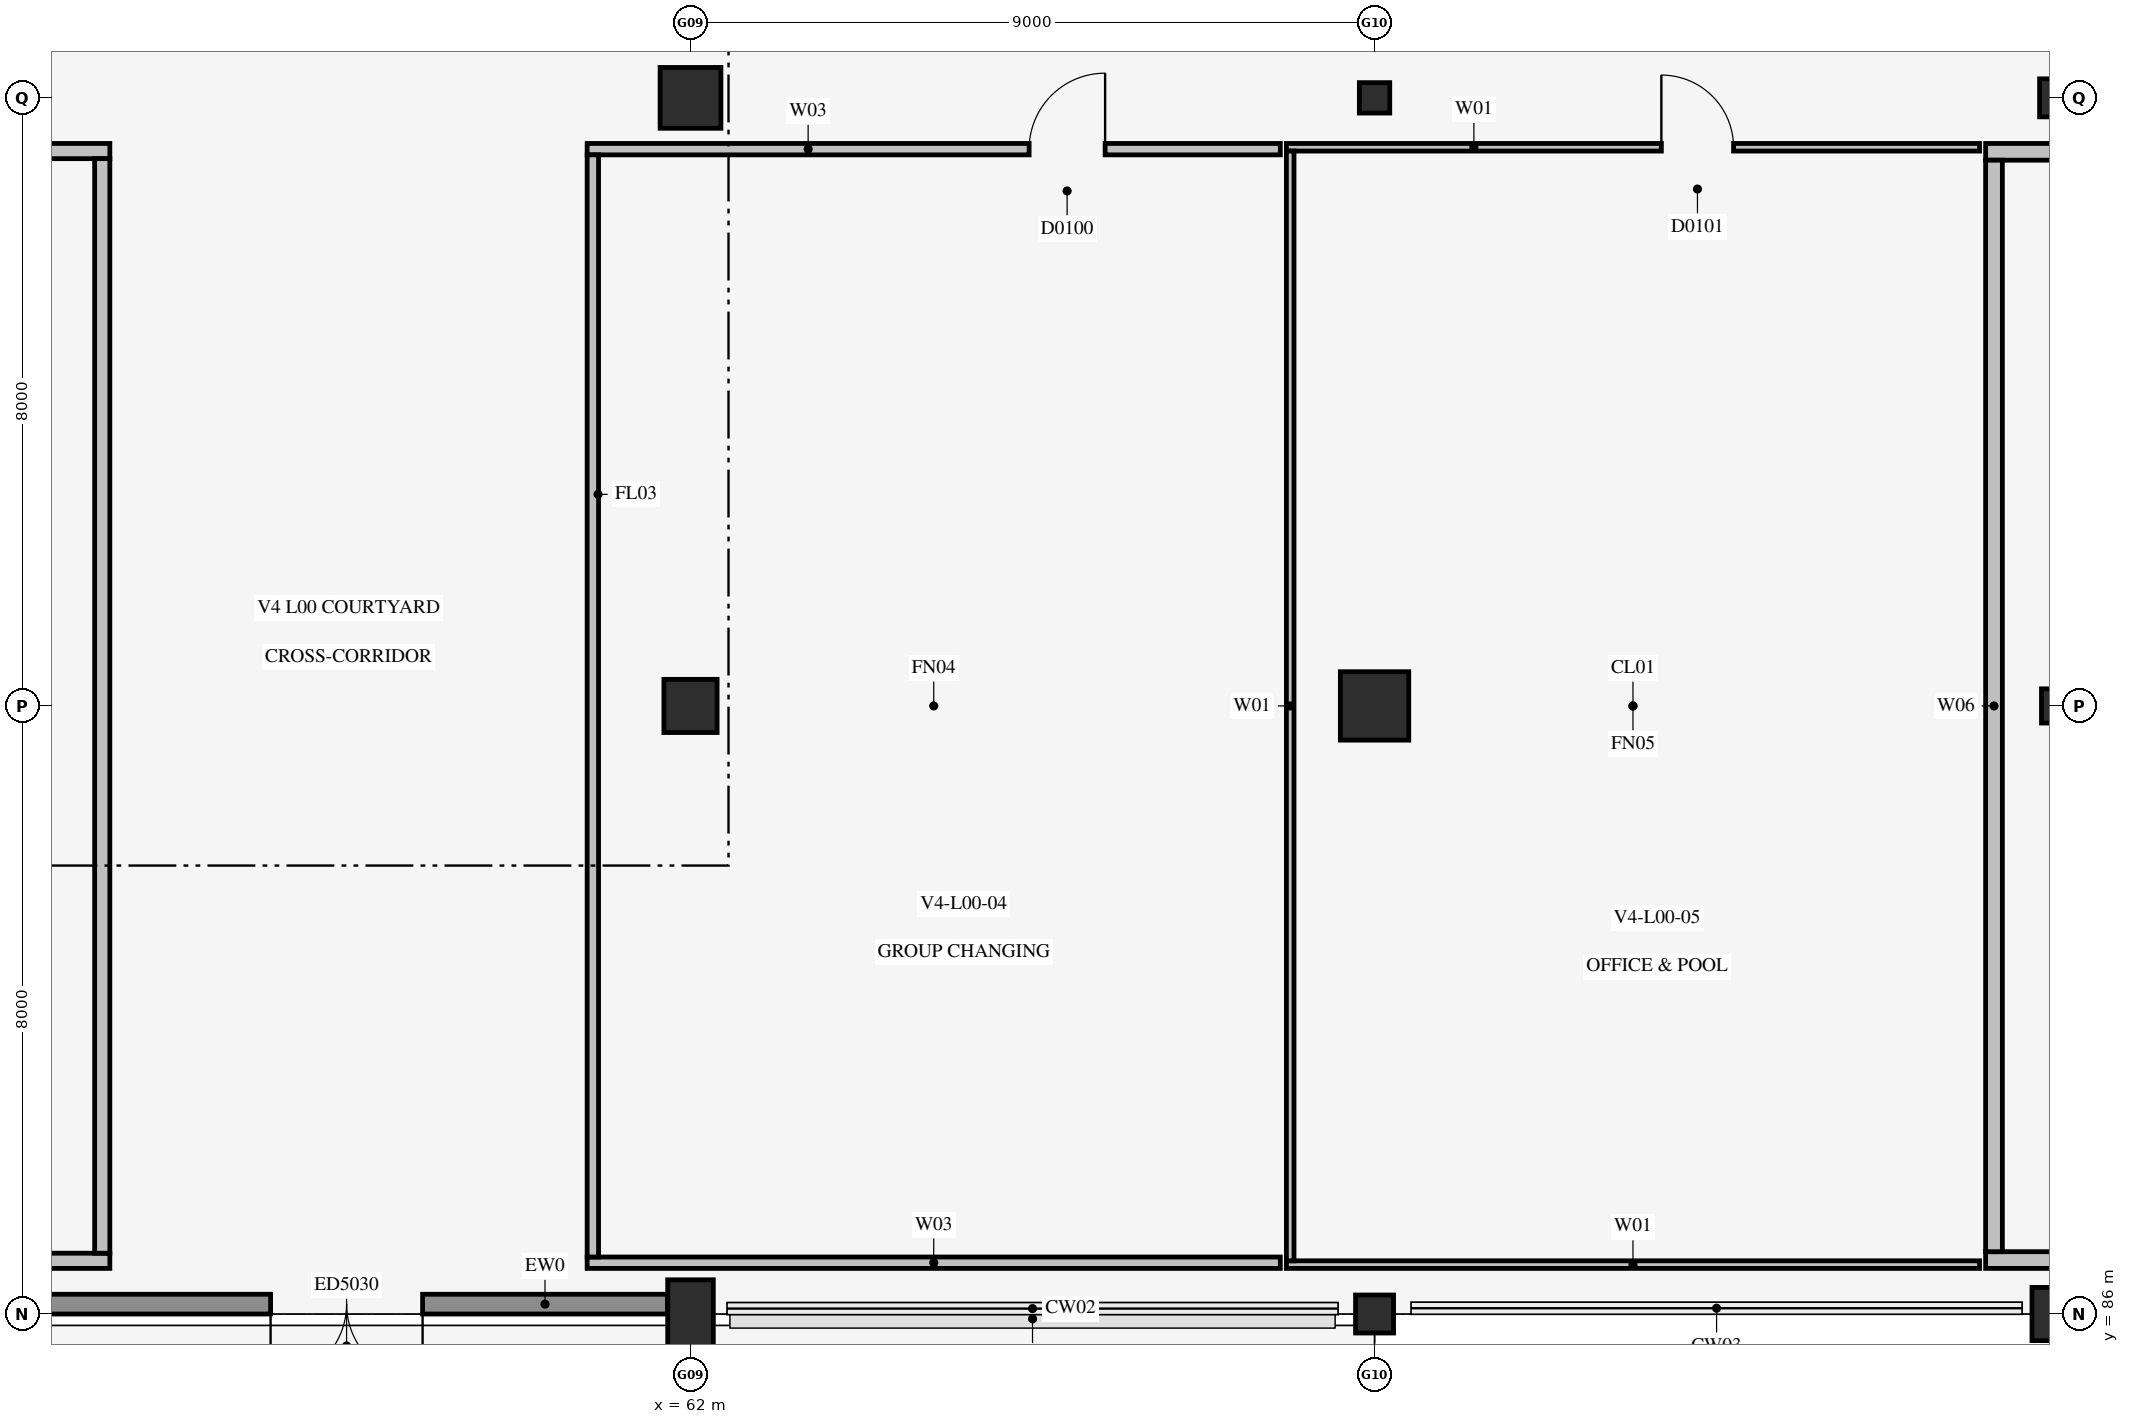
"""IFC4 building model, lengths in metres.
Left out: names, types, materials, properties, quantities, classifications, styles, units other than length and angle.
Written with IfcOpenShell. Run it as: python <this file> out.ifc"""

import sys

from ifc_helpers import new_model, si_unit, direction, frame, frame_2d, origin, origin_2d, place, context, subcontext, project, spatial, rectangle, circle, extrude, element, fill, save


model = new_model("IFC4")
c1 = context("Model", 3, precision=1e-05, world=origin(), true_north=direction((0.0, 1.0)))
c2 = subcontext(c1, "Body", "Model", "MODEL_VIEW")
j1 = project(units=[si_unit("LENGTHUNIT", "METRE"), si_unit("PLANEANGLEUNIT", "RADIAN")], contexts=[c1])
p1 = place(None, origin())
s1 = spatial("IfcSite", under=j1, at=p1, CompositionType="ELEMENT")
p2 = place(p1, origin())
s2 = spatial("IfcBuilding", under=s1, at=p2, CompositionType="ELEMENT")
p3 = place(p2, origin())
s3 = spatial("IfcBuildingStorey", under=s2, at=p3, CompositionType="ELEMENT", Elevation=0.0)
p4 = place(p3, frame((62.0, 86.0, 0.0), z_axis=(0.0, 0.0, 1.0), x_axis=(1.0, 0.0, 0.0)))
e1 = element("IfcColumn", 1, at=p4, inside=s3, PredefinedType="COLUMN", context=c2, shape_type="SweptSolid", body=[
    extrude(rectangle(XDim=0.6, YDim=0.9, at=origin_2d()), origin(), (0.0, 0.0, 1.0), 5.4),
])
p5 = place(p3, frame((62.0, 94.0, 0.0), z_axis=(0.0, 0.0, 1.0), x_axis=(1.0, 0.0, 0.0)))
e2 = element("IfcColumn", 2, at=p5, inside=s3, PredefinedType="COLUMN", context=c2, shape_type="SweptSolid", body=[
    extrude(circle(Radius=0.35, at=origin_2d()), origin(), (0.0, 0.0, 1.0), 5.4),
])
p6 = place(p3, frame((62.0, 102.0, 0.0), z_axis=(0.0, 0.0, 1.0), x_axis=(1.0, 0.0, 0.0)))
e3 = element("IfcColumn", 3, at=p6, inside=s3, PredefinedType="COLUMN", context=c2, shape_type="SweptSolid", body=[
    extrude(circle(Radius=0.4, at=origin_2d()), origin(), (0.0, 0.0, 1.0), 5.4),
])
p7 = place(p3, frame((71.0, 86.0, 0.0), z_axis=(0.0, 0.0, 1.0), x_axis=(1.0, 0.0, 0.0)))
e4 = element("IfcColumn", 4, at=p7, inside=s3, PredefinedType="COLUMN", context=c2, shape_type="SweptSolid", body=[
    extrude(circle(Radius=0.25, at=origin_2d()), origin(), (0.0, 0.0, 1.0), 5.4),
])
p8 = place(p3, frame((71.0, 94.0, 0.0), z_axis=(0.0, 0.0, 1.0), x_axis=(1.0, 0.0, 0.0)))
e5 = element("IfcColumn", 5, at=p8, inside=s3, PredefinedType="COLUMN", context=c2, shape_type="SweptSolid", body=[
    extrude(circle(Radius=0.45, at=origin_2d()), origin(), (0.0, 0.0, 1.0), 5.4),
])
p9 = place(p3, frame((71.0, 102.0, 0.0), z_axis=(0.0, 0.0, 1.0), x_axis=(1.0, 0.0, 0.0)))
e6 = element("IfcColumn", 6, at=p9, inside=s3, PredefinedType="COLUMN", context=c2, shape_type="SweptSolid", body=[
    extrude(rectangle(XDim=0.4, YDim=0.4, at=origin_2d()), origin(), (0.0, 0.0, 1.0), 5.4),
])
p10 = place(p3, frame((80.0, 86.0, 0.0), z_axis=(0.0, 0.0, 1.0), x_axis=(1.0, 0.0, 0.0)))
e7 = element("IfcColumn", 7, at=p10, inside=s3, PredefinedType="COLUMN", context=c2, shape_type="SweptSolid", body=[
    extrude(circle(Radius=0.35, at=origin_2d()), origin(), (0.0, 0.0, 1.0), 5.4),
])
p11 = place(p3, frame((80.0, 94.0, 0.0), z_axis=(0.0, 0.0, 1.0), x_axis=(1.0, 0.0, 0.0)))
e8 = element("IfcColumn", 8, at=p11, inside=s3, PredefinedType="COLUMN", context=c2, shape_type="SweptSolid", body=[
    extrude(rectangle(XDim=0.45, YDim=0.45, at=origin_2d()), origin(), (0.0, 0.0, 1.0), 5.4),
])
p12 = place(p3, frame((80.0, 102.0, 0.0), z_axis=(0.0, 0.0, 1.0), x_axis=(1.0, 0.0, 0.0)))
e9 = element("IfcColumn", 9, at=p12, inside=s3, PredefinedType="COLUMN", context=c2, shape_type="SweptSolid", body=[
    extrude(rectangle(XDim=0.5, YDim=0.5, at=origin_2d()), origin(), (0.0, 0.0, 1.0), 5.4),
])
p13 = place(p3, frame((39.907, 86.7, 0.0), z_axis=(0.0, 0.0, 1.0), x_axis=(1.0, 0.0, 0.0)))
e10 = element("IfcWall", 10, at=p13, inside=s3, PredefinedType="PLUMBINGWALL", context=c2, shape_type="SweptSolid", body=[
    extrude(rectangle(XDim=14.453, YDim=0.2, at=frame_2d((7.227, 0.0))), origin(), (0.0, 0.0, 1.0), 5.145),
])
p14 = place(p3, frame((39.907, 101.3, 0.0), z_axis=(0.0, 0.0, 1.0), x_axis=(1.0, 0.0, 0.0)))
e11 = element("IfcWall", 11, at=p14, inside=s3, PredefinedType="PLUMBINGWALL", context=c2, shape_type="SweptSolid", body=[
    extrude(rectangle(XDim=14.453, YDim=0.2, at=frame_2d((7.227, 0.0))), origin(), (0.0, 0.0, 1.0), 5.145),
])
p15 = place(p14, frame((9.89, 0.0, 0.0)))
e12 = element("IfcOpeningElement", 12, at=p15, cuts=e11, PredefinedType="OPENING", context=c2, shape_type="SweptSolid", body=[
    extrude(rectangle(XDim=0.9, YDim=2.1, at=frame_2d((0.45, 1.05))), frame((0.0, 0.112, 0.0), z_axis=(0.0, -1.0, 0.0), x_axis=(1.0, 0.0, 0.0)), (0.0, 0.0, 1.0), 0.224),
])
p16 = place(p3, frame((54.26, 86.8, 0.0), z_axis=(0.0, 0.0, 1.0), x_axis=(0.0, 1.0, 0.0)))
e13 = element("IfcWall", 13, at=p16, inside=s3, PredefinedType="PLUMBINGWALL", context=c2, shape_type="SweptSolid", body=[
    extrude(rectangle(XDim=14.4, YDim=0.2, at=frame_2d((7.2, 0.0))), origin(), (0.0, 0.0, 1.0), 5.145),
])
p17 = place(p3, frame((60.64, 86.675, 0.0), z_axis=(0.0, 0.0, 1.0), x_axis=(1.0, 0.0, 0.0)))
e14 = element("IfcWall", 14, at=p17, inside=s3, PredefinedType="PARTITIONING", context=c2, shape_type="SweptSolid", body=[
    extrude(rectangle(XDim=9.12, YDim=0.15, at=frame_2d((4.56, 0.0))), origin(), (0.0, 0.0, 1.0), 5.145),
])
p18 = place(p3, frame((60.64, 101.325, 0.0), z_axis=(0.0, 0.0, 1.0), x_axis=(1.0, 0.0, 0.0)))
e15 = element("IfcWall", 15, at=p18, inside=s3, PredefinedType="PARTITIONING", context=c2, shape_type="SweptSolid", body=[
    extrude(rectangle(XDim=9.12, YDim=0.15, at=frame_2d((4.56, 0.0))), origin(), (0.0, 0.0, 1.0), 5.145),
])
p19 = place(p18, frame((5.815, 0.0, 0.0)))
e16 = element("IfcOpeningElement", 16, at=p19, cuts=e15, PredefinedType="OPENING", context=c2, shape_type="SweptSolid", body=[
    extrude(rectangle(XDim=1.0, YDim=2.2, at=frame_2d((0.5, 1.1))), frame((0.0, 0.087, 0.0), z_axis=(0.0, -1.0, 0.0), x_axis=(1.0, 0.0, 0.0)), (0.0, 0.0, 1.0), 0.174),
])
p20 = place(p3, frame((60.715, 86.75, 0.0), z_axis=(0.0, 0.0, 1.0), x_axis=(0.0, 1.0, 0.0)))
e17 = element("IfcWall", 17, at=p20, inside=s3, PredefinedType="PARTITIONING", context=c2, shape_type="SweptSolid", body=[
    extrude(rectangle(XDim=14.5, YDim=0.15, at=frame_2d((7.25, 0.0))), origin(), (0.0, 0.0, 1.0), 5.145),
])
p21 = place(p3, frame((69.84, 86.65, 0.0), z_axis=(0.0, 0.0, 1.0), x_axis=(1.0, 0.0, 0.0)))
e18 = element("IfcWall", 18, at=p21, inside=s3, PredefinedType="PARTITIONING", context=c2, shape_type="SweptSolid", body=[
    extrude(rectangle(XDim=9.12, YDim=0.1, at=frame_2d((4.56, 0.0))), origin(), (0.0, 0.0, 1.0), 5.145),
])
p22 = place(p3, frame((69.84, 101.35, 0.0), z_axis=(0.0, 0.0, 1.0), x_axis=(1.0, 0.0, 0.0)))
e19 = element("IfcWall", 19, at=p22, inside=s3, PredefinedType="PARTITIONING", context=c2, shape_type="SweptSolid", body=[
    extrude(rectangle(XDim=9.12, YDim=0.1, at=frame_2d((4.56, 0.0))), origin(), (0.0, 0.0, 1.0), 5.145),
])
p23 = place(p22, frame((4.933, 0.0, 0.0)))
e20 = element("IfcOpeningElement", 20, at=p23, cuts=e19, PredefinedType="OPENING", context=c2, shape_type="SweptSolid", body=[
    extrude(rectangle(XDim=0.95, YDim=2.15, at=frame_2d((0.475, 1.075))), frame((0.0, 0.062, 0.0), z_axis=(0.0, -1.0, 0.0), x_axis=(1.0, 0.0, 0.0)), (0.0, 0.0, 1.0), 0.124),
])
p24 = place(p3, frame((69.89, 86.7, 0.0), z_axis=(0.0, 0.0, 1.0), x_axis=(0.0, 1.0, 0.0)))
e21 = element("IfcWall", 21, at=p24, inside=s3, PredefinedType="PARTITIONING", context=c2, shape_type="SweptSolid", body=[
    extrude(rectangle(XDim=14.6, YDim=0.1, at=frame_2d((7.3, 0.0))), origin(), (0.0, 0.0, 1.0), 5.145),
])
p25 = place(p3, frame((79.04, 86.71, 0.0), z_axis=(0.0, 0.0, 1.0), x_axis=(1.0, 0.0, 0.0)))
e22 = element("IfcWall", 22, at=p25, inside=s3, PredefinedType="PLUMBINGWALL", context=c2, shape_type="SweptSolid", body=[
    extrude(rectangle(XDim=9.12, YDim=0.22, at=frame_2d((4.56, 0.0))), origin(), (0.0, 0.0, 1.0), 5.145),
])
p26 = place(p3, frame((79.04, 101.29, 0.0), z_axis=(0.0, 0.0, 1.0), x_axis=(1.0, 0.0, 0.0)))
e23 = element("IfcWall", 23, at=p26, inside=s3, PredefinedType="PLUMBINGWALL", context=c2, shape_type="SweptSolid", body=[
    extrude(rectangle(XDim=9.12, YDim=0.22, at=frame_2d((4.56, 0.0))), origin(), (0.0, 0.0, 1.0), 5.145),
])
p27 = place(p26, frame((4.871, 0.0, 0.0)))
e24 = element("IfcOpeningElement", 24, at=p27, cuts=e23, PredefinedType="OPENING", context=c2, shape_type="SweptSolid", body=[
    extrude(rectangle(XDim=1.05, YDim=2.15, at=frame_2d((0.525, 1.075))), frame((0.0, 0.122, 0.0), z_axis=(0.0, -1.0, 0.0), x_axis=(1.0, 0.0, 0.0)), (0.0, 0.0, 1.0), 0.244),
])
p28 = place(p3, frame((79.15, 86.82, 0.0), z_axis=(0.0, 0.0, 1.0), x_axis=(0.0, 1.0, 0.0)))
e25 = element("IfcWall", 25, at=p28, inside=s3, PredefinedType="PLUMBINGWALL", context=c2, shape_type="SweptSolid", body=[
    extrude(rectangle(XDim=14.36, YDim=0.22, at=frame_2d((7.18, 0.0))), origin(), (0.0, 0.0, 1.0), 5.145),
])
p29 = place(p3, frame((53.254, 86.13, 0.0), z_axis=(0.0, 0.0, 1.0), x_axis=(1.0, 0.0, 0.0)))
e26 = element("IfcWall", 26, at=p29, inside=s3, PredefinedType="SOLIDWALL", context=c2, shape_type="SweptSolid", body=[
    extrude(rectangle(XDim=8.442, YDim=0.26, at=frame_2d((4.221, 0.0))), origin(), (0.0, 0.0, 1.0), 4.594),
])
p30 = place(p29, frame((3.221, 0.0, 0.0)))
e27 = element("IfcOpeningElement", 27, at=p30, cuts=e26, PredefinedType="OPENING", context=c2, shape_type="SweptSolid", body=[
    extrude(rectangle(XDim=2.0, YDim=2.4, at=frame_2d((1.0, 1.2))), frame((0.0, 0.142, 0.0), z_axis=(0.0, -1.0, 0.0), x_axis=(1.0, 0.0, 0.0)), (0.0, 0.0, 1.0), 0.284),
])
p31 = place(p19, frame((1.0, 0.0, 0.0), z_axis=(0.0, 0.0, 1.0), x_axis=(-1.0, 0.0, 0.0)))
e28 = element("IfcDoor", 28, at=p31, inside=s3, OperationType="SINGLE_SWING_RIGHT", PredefinedType="DOOR", context=c2, shape_type="SweptSolid", body=[
    extrude(rectangle(XDim=1.0, YDim=2.2, at=frame_2d((0.5, 1.1))), frame((0.0, 0.025, 0.0), z_axis=(0.0, -1.0, 0.0), x_axis=(1.0, 0.0, 0.0)), (0.0, 0.0, 1.0), 0.05),
])
fill(e16, e28)
p32 = place(p23, frame((0.95, 0.0, 0.0), z_axis=(0.0, 0.0, 1.0), x_axis=(-1.0, 0.0, 0.0)))
e29 = element("IfcDoor", 29, at=p32, inside=s3, OperationType="SINGLE_SWING_LEFT", PredefinedType="DOOR", context=c2, shape_type="SweptSolid", body=[
    extrude(rectangle(XDim=0.95, YDim=2.15, at=frame_2d((0.475, 1.075))), frame((0.0, 0.025, 0.0), z_axis=(0.0, -1.0, 0.0), x_axis=(1.0, 0.0, 0.0)), (0.0, 0.0, 1.0), 0.05),
])
fill(e20, e29)
p33 = place(p30, frame((2.0, 0.0, 0.0), z_axis=(0.0, 0.0, 1.0), x_axis=(-1.0, 0.0, 0.0)))
e30 = element("IfcDoor", 30, at=p33, inside=s3, OperationType="DOUBLE_DOOR_SINGLE_SWING", PredefinedType="DOOR", context=c2, shape_type="SweptSolid", body=[
    extrude(rectangle(XDim=2.0, YDim=2.4, at=frame_2d((1.0, 1.2))), frame((0.0, 0.025, 0.0), z_axis=(0.0, -1.0, 0.0), x_axis=(1.0, 0.0, 0.0)), (0.0, 0.0, 1.0), 0.05),
])
fill(e27, e30)
save(model, sys.argv[1])
